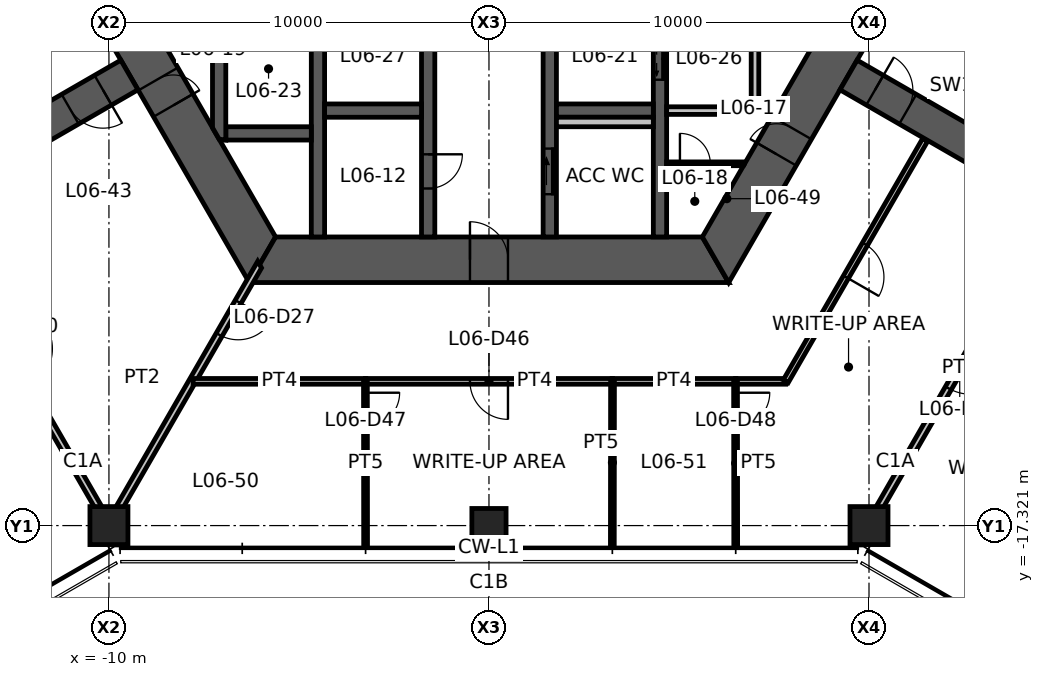
"""IFC4 building model, lengths in metres.
Left out: names, types, materials, properties, quantities, classifications, styles, units other than length and angle.
Written with IfcOpenShell. Run it as: python <this file> out.ifc"""

import sys

from ifc_helpers import new_model, si_unit, direction, frame, frame_2d, origin, origin_2d, place, context, subcontext, project, spatial, polyline, rectangle, hollow_rectangle, outline, extrude, element, fill, save


model = new_model("IFC4")
c1 = context("Model", 3, precision=1e-05, world=origin(), true_north=direction((0.0, 1.0)))
c2 = subcontext(c1, "Body", "Model", "MODEL_VIEW")
j1 = project(units=[si_unit("LENGTHUNIT", "METRE"), si_unit("PLANEANGLEUNIT", "RADIAN")], contexts=[c1])
p1 = place(None, origin())
s1 = spatial("IfcSite", under=j1, at=p1, CompositionType="ELEMENT")
p2 = place(p1, origin())
s2 = spatial("IfcBuilding", under=s1, at=p2, CompositionType="ELEMENT")
p3 = place(p2, frame((0.0, 0.0, 22.6)))
s3 = spatial("IfcBuildingStorey", under=s2, at=p3, CompositionType="ELEMENT", Elevation=22.6)
for number, where, z_axis, x_axis in (
    (1, (-10.0, -17.321, 0.0), (0.0, 0.0, 1.0), (1.0, 0.0, 0.0)),
    (2, (10.0, -17.321, 0.0), (0.0, 0.0, 1.0), (1.0, 0.0, 0.0)),
):
    element("IfcColumn", number, at=place(p3, frame(where, z_axis=z_axis, x_axis=x_axis)), inside=s3, PredefinedType="COLUMN", context=c2, shape_type="SweptSolid", body=[
        extrude(hollow_rectangle(XDim=1.0, YDim=1.0, WallThickness=0.06, at=origin_2d()), origin(), (0.0, 0.0, 1.0), 4.2),
    ])
p4 = place(p3, frame((0.0, -17.321, 0.0), z_axis=(0.0, 0.0, 1.0), x_axis=(1.0, 0.0, 0.0)))
e3 = element("IfcColumn", 3, at=p4, inside=s3, PredefinedType="COLUMN", context=c2, shape_type="SweptSolid", body=[
    extrude(hollow_rectangle(XDim=0.9, YDim=0.9, WallThickness=0.05, at=origin_2d()), origin(), (0.0, 0.0, 1.0), 4.2),
])
p5 = place(p3, frame((-11.922, 0.0, 0.0), z_axis=(0.0, 0.0, 1.0), x_axis=(0.500004296715, -0.866022923061, 0.0)))
e4 = element("IfcWall", 4, at=p5, inside=s3, PredefinedType="SHEAR", context=c2, shape_type="SweptSolid", body=[
    extrude(outline(polyline([(-0.346, -0.6), (6.431, -0.6), (7.231, -0.6), (12.269, -0.6), (11.576, 0.6), (7.231, 0.6), (6.431, 0.6), (0.346, 0.6), (-0.346, -0.6)])), origin(), (0.0, 0.0, 1.0), 4.2),
])
p6 = place(p5, frame((6.431, 0.0, 0.0)))
e5 = element("IfcOpeningElement", 5, at=p6, cuts=e4, PredefinedType="OPENING", context=c2, shape_type="SweptSolid", body=[
    extrude(rectangle(XDim=0.8, YDim=2.1, at=frame_2d((0.4, 1.05))), frame((0.0, 0.61, 0.0), z_axis=(0.0, -1.0, 0.0), x_axis=(1.0, 0.0, 0.0)), (0.0, 0.0, 1.0), 1.22),
])
p7 = place(p3, frame((-5.961, -10.325, 0.0), z_axis=(0.0, 0.0, 1.0), x_axis=(1.0, 0.0, 0.0)))
e6 = element("IfcWall", 6, at=p7, inside=s3, PredefinedType="SHEAR", context=c2, shape_type="SweptSolid", body=[
    extrude(outline(polyline([(-0.346, -0.6), (5.461, -0.6), (6.461, -0.6), (12.269, -0.6), (11.576, 0.6), (6.461, 0.6), (5.461, 0.6), (0.346, 0.6), (-0.346, -0.6)])), origin(), (0.0, 0.0, 1.0), 4.2),
])
p8 = place(p7, frame((5.461, 0.0, 0.0)))
e7 = element("IfcOpeningElement", 7, at=p8, cuts=e6, PredefinedType="OPENING", context=c2, shape_type="SweptSolid", body=[
    extrude(rectangle(XDim=1.0, YDim=2.1, at=frame_2d((0.5, 1.05))), frame((0.0, 0.61, 0.0), z_axis=(0.0, -1.0, 0.0), x_axis=(1.0, 0.0, 0.0)), (0.0, 0.0, 1.0), 1.22),
])
p9 = place(p3, frame((5.961, -10.325, 0.0), z_axis=(0.0, 0.0, 1.0), x_axis=(0.500004296715, 0.866022923061, 0.0)))
e8 = element("IfcWall", 8, at=p9, inside=s3, PredefinedType="SHEAR", context=c2, shape_type="SweptSolid", body=[
    extrude(outline(polyline([(-0.346, -0.6), (3.208, -0.6), (4.009, -0.6), (12.269, -0.6), (11.576, 0.6), (4.009, 0.6), (3.208, 0.6), (0.346, 0.6), (-0.346, -0.6)])), origin(), (0.0, 0.0, 1.0), 4.2),
])
p10 = place(p9, frame((3.208, 0.0, 0.0)))
e9 = element("IfcOpeningElement", 9, at=p10, cuts=e8, PredefinedType="OPENING", context=c2, shape_type="SweptSolid", body=[
    extrude(rectangle(XDim=0.8, YDim=2.1, at=frame_2d((0.4, 1.05))), frame((0.0, 0.61, 0.0), z_axis=(0.0, -1.0, 0.0), x_axis=(1.0, 0.0, 0.0)), (0.0, 0.0, 1.0), 1.22),
])
p11 = place(p3, frame((-9.461, -5.462, 0.0), z_axis=(0.0, 0.0, 1.0), x_axis=(-0.866019116917, -0.500010889016, 0.0)))
e10 = element("IfcWall", 10, at=p11, inside=s3, PredefinedType="SHEAR", context=c2, shape_type="SweptSolid", body=[
    extrude(rectangle(XDim=7.595, YDim=0.9, at=frame_2d((3.798, 0.0))), origin(), (0.0, 0.0, 1.0), 4.2),
])
p12 = place(p11, frame((0.8, 0.0, 0.0)))
e11 = element("IfcOpeningElement", 11, at=p12, cuts=e10, PredefinedType="OPENING", context=c2, shape_type="SweptSolid", body=[
    extrude(rectangle(XDim=1.0, YDim=2.1, at=frame_2d((0.5, 1.05))), frame((0.0, 0.46, 0.0), z_axis=(0.0, -1.0, 0.0), x_axis=(1.0, 0.0, 0.0)), (0.0, 0.0, 1.0), 0.92),
])
p13 = place(p3, frame((9.461, -5.462, 0.0), z_axis=(0.0, 0.0, 1.0), x_axis=(0.866019116917, -0.500010889016, 0.0)))
e12 = element("IfcWall", 12, at=p13, inside=s3, PredefinedType="SHEAR", context=c2, shape_type="SweptSolid", body=[
    extrude(rectangle(XDim=7.595, YDim=0.9, at=frame_2d((3.798, 0.0))), origin(), (0.0, 0.0, 1.0), 4.2),
])
p14 = place(p13, frame((0.8, 0.0, 0.0)))
e13 = element("IfcOpeningElement", 13, at=p14, cuts=e12, PredefinedType="OPENING", context=c2, shape_type="SweptSolid", body=[
    extrude(rectangle(XDim=1.0, YDim=2.1, at=frame_2d((0.5, 1.05))), frame((0.0, 0.46, 0.0), z_axis=(0.0, -1.0, 0.0), x_axis=(1.0, 0.0, 0.0)), (0.0, 0.0, 1.0), 0.92),
])
p15 = place(p3, frame((-1.6, -3.775, 0.0), z_axis=(0.0, 0.0, 1.0), x_axis=(0.0, -1.0, 0.0)))
e14 = element("IfcWall", 14, at=p15, inside=s3, PredefinedType="SHEAR", context=c2, shape_type="SweptSolid", body=[
    extrude(rectangle(XDim=5.95, YDim=0.35, at=frame_2d((2.975, 0.0))), origin(), (0.0, 0.0, 1.0), 4.2),
])
p16 = place(p15, frame((3.775, 0.0, 0.0)))
e15 = element("IfcOpeningElement", 15, at=p16, cuts=e14, PredefinedType="OPENING", context=c2, shape_type="SweptSolid", body=[
    extrude(rectangle(XDim=0.9, YDim=2.1, at=frame_2d((0.45, 1.05))), frame((0.0, 0.185, 0.0), z_axis=(0.0, -1.0, 0.0), x_axis=(1.0, 0.0, 0.0)), (0.0, 0.0, 1.0), 0.37),
])
p17 = place(p3, frame((1.6, -3.775, 0.0), z_axis=(0.0, 0.0, 1.0), x_axis=(0.0, -1.0, 0.0)))
e16 = element("IfcWall", 16, at=p17, inside=s3, PredefinedType="SHEAR", context=c2, shape_type="SweptSolid", body=[
    extrude(rectangle(XDim=5.95, YDim=0.35, at=frame_2d((2.975, 0.0))), origin(), (0.0, 0.0, 1.0), 4.2),
])
p18 = place(p17, frame((3.625, 0.0, 0.0)))
e17 = element("IfcOpeningElement", 17, at=p18, cuts=e16, PredefinedType="OPENING", context=c2, shape_type="SweptSolid", body=[
    extrude(rectangle(XDim=1.2, YDim=2.1, at=frame_2d((0.6, 1.05))), frame((0.0, 0.185, 0.0), z_axis=(0.0, -1.0, 0.0), x_axis=(1.0, 0.0, 0.0)), (0.0, 0.0, 1.0), 0.37),
])
p19 = place(p3, frame((-4.5, -3.775, 0.0), z_axis=(0.0, 0.0, 1.0), x_axis=(0.0, -1.0, 0.0)))
e18 = element("IfcWall", 18, at=p19, inside=s3, PredefinedType="SHEAR", context=c2, shape_type="SweptSolid", body=[
    extrude(rectangle(XDim=5.95, YDim=0.35, at=frame_2d((2.975, 0.0))), origin(), (0.0, 0.0, 1.0), 4.2),
])
p20 = place(p3, frame((4.5, -3.775, 0.0), z_axis=(0.0, 0.0, 1.0), x_axis=(0.0, -1.0, 0.0)))
e19 = element("IfcWall", 19, at=p20, inside=s3, PredefinedType="SHEAR", context=c2, shape_type="SweptSolid", body=[
    extrude(rectangle(XDim=5.95, YDim=0.35, at=frame_2d((2.975, 0.0))), origin(), (0.0, 0.0, 1.0), 4.2),
])
p21 = place(p20, frame((0.712, 0.0, 0.0)))
e20 = element("IfcOpeningElement", 20, at=p21, cuts=e19, PredefinedType="OPENING", context=c2, shape_type="SweptSolid", body=[
    extrude(rectangle(XDim=1.1, YDim=2.1, at=frame_2d((0.55, 1.05))), frame((0.0, 0.185, 0.0), z_axis=(0.0, -1.0, 0.0), x_axis=(1.0, 0.0, 0.0)), (0.0, 0.0, 1.0), 0.37),
])
for number, where, z_axis, x_axis in (
    (21, (-4.325, -6.4, 0.0), (0.0, 0.0, 1.0), (1.0, 0.0, 0.0)),
    (22, (1.775, -6.4, 0.0), (0.0, 0.0, 1.0), (1.0, 0.0, 0.0)),
):
    element("IfcWall", number, at=place(p3, frame(where, z_axis=z_axis, x_axis=x_axis)), inside=s3, PredefinedType="SHEAR", context=c2, shape_type="SweptSolid", body=[
        extrude(rectangle(XDim=2.55, YDim=0.35, at=frame_2d((1.275, 0.0))), origin(), (0.0, 0.0, 1.0), 4.2),
    ])
p22 = place(p3, frame((-6.925, -7.0, 0.0), z_axis=(0.0, 0.0, 1.0), x_axis=(1.0, 0.0, 0.0)))
e23 = element("IfcWall", 23, at=p22, inside=s3, PredefinedType="SHEAR", context=c2, shape_type="SweptSolid", body=[
    extrude(rectangle(XDim=2.25, YDim=0.35, at=frame_2d((1.125, 0.0))), origin(), (0.0, 0.0, 1.0), 4.2),
])
p23 = place(p3, frame((-7.1, -3.775, 0.0), z_axis=(0.0, 0.0, 1.0), x_axis=(0.0, -1.0, 0.0)))
e24 = element("IfcWall", 24, at=p23, inside=s3, PredefinedType="SHEAR", context=c2, shape_type="SweptSolid", body=[
    extrude(outline(polyline([(0.0, -0.175), (3.074, -0.175), (3.377, 0.0), (3.4, 0.175), (0.0, 0.175), (0.0, -0.175)])), origin(), (0.0, 0.0, 1.0), 4.2),
])
p24 = place(p3, frame((4.675, -6.4, 0.0), z_axis=(0.0, 0.0, 1.0), x_axis=(1.0, 0.0, 0.0)))
e25 = element("IfcWall", 25, at=p24, inside=s3, PredefinedType="STANDARD", context=c2, shape_type="SweptSolid", body=[
    extrude(rectangle(XDim=2.425, YDim=0.2, at=frame_2d((1.212, 0.0))), origin(), (0.0, 0.0, 1.0), 4.2),
])
p25 = place(p3, frame((7.0, -3.775, 0.0), z_axis=(0.0, 0.0, 1.0), x_axis=(0.0, -1.0, 0.0)))
e26 = element("IfcWall", 26, at=p25, inside=s3, PredefinedType="STANDARD", context=c2, shape_type="SweptSolid", body=[
    extrude(rectangle(XDim=2.525, YDim=0.2, at=frame_2d((1.263, 0.0))), origin(), (0.0, 0.0, 1.0), 4.2),
])
p26 = place(p3, frame((1.775, -6.7, 0.0), z_axis=(0.0, 0.0, 1.0), x_axis=(1.0, 0.0, 0.0)))
e27 = element("IfcWall", 27, at=p26, inside=s3, PredefinedType="PLUMBINGWALL", context=c2, shape_type="SweptSolid", body=[
    extrude(rectangle(XDim=2.55, YDim=0.25, at=frame_2d((1.275, 0.0))), origin(), (0.0, 0.0, 1.0), 4.2),
])
p27 = place(p3, frame((4.675, -7.8, 0.0), z_axis=(0.0, 0.0, 1.0), x_axis=(1.0, 0.0, 0.0)))
e28 = element("IfcWall", 28, at=p27, inside=s3, PredefinedType="PARTITIONING", context=c2, shape_type="SweptSolid", body=[
    extrude(outline(polyline([(0.0, -0.05), (0.35, -0.05), (1.15, -0.05), (2.022, -0.05), (2.051, 0.0), (2.057, 0.05), (1.15, 0.05), (0.35, 0.05), (0.0, 0.05), (0.0, -0.05)])), origin(), (0.0, 0.0, 1.0), 3.2),
])
p28 = place(p27, frame((0.35, 0.0, 0.0)))
e29 = element("IfcOpeningElement", 29, at=p28, cuts=e28, PredefinedType="OPENING", context=c2, shape_type="SweptSolid", body=[
    extrude(rectangle(XDim=0.8, YDim=2.1, at=frame_2d((0.4, 1.05))), frame((0.0, 0.06, 0.0), z_axis=(0.0, -1.0, 0.0), x_axis=(1.0, 0.0, 0.0)), (0.0, 0.0, 1.0), 0.12),
])
p29 = place(p3, frame((-6.035, -10.453, 0.0), z_axis=(0.0, 0.0, 1.0), x_axis=(-0.499993402427, -0.866029212861, 0.0)))
e30 = element("IfcWall", 30, at=p29, inside=s3, PredefinedType="PARTITIONING", context=c2, shape_type="SweptSolid", body=[
    extrude(outline(polyline([(-0.051, -0.087), (1.129, -0.087), (2.129, -0.087), (7.93, -0.087), (7.93, 0.087), (2.129, 0.087), (1.129, 0.087), (0.051, 0.087), (-0.051, -0.087)])), origin(), (0.0, 0.0, 1.0), 3.3),
])
p30 = place(p29, frame((1.129, 0.0, 0.0)))
e31 = element("IfcOpeningElement", 31, at=p30, cuts=e30, PredefinedType="OPENING", context=c2, shape_type="SweptSolid", body=[
    extrude(rectangle(XDim=1.0, YDim=2.1, at=frame_2d((0.5, 1.05))), frame((0.0, 0.098, 0.0), z_axis=(0.0, -1.0, 0.0), x_axis=(1.0, 0.0, 0.0)), (0.0, 0.0, 1.0), 0.195),
])
p31 = place(p3, frame((-14.775, -9.05, 0.0), z_axis=(0.0, 0.0, 1.0), x_axis=(0.499993908199, -0.866028920859, 0.0)))
e32 = element("IfcWall", 32, at=p31, inside=s3, PredefinedType="PARTITIONING", context=c2, shape_type="SweptSolid", body=[
    extrude(rectangle(XDim=9.55, YDim=0.175, at=frame_2d((4.775, 0.0))), origin(), (0.0, 0.0, 1.0), 3.208),
])
p32 = place(p31, frame((4.175, 0.0, 0.0)))
e33 = element("IfcOpeningElement", 33, at=p32, cuts=e32, PredefinedType="OPENING", context=c2, shape_type="SweptSolid", body=[
    extrude(rectangle(XDim=1.2, YDim=2.1, at=frame_2d((0.6, 1.05))), frame((0.0, 0.098, 0.0), z_axis=(0.0, -1.0, 0.0), x_axis=(1.0, 0.0, 0.0)), (0.0, 0.0, 1.0), 0.195),
])
p33 = place(p3, frame((14.775, -9.05, 0.0), z_axis=(0.0, 0.0, 1.0), x_axis=(-0.499993908199, -0.866028920859, 0.0)))
e34 = element("IfcWall", 34, at=p33, inside=s3, PredefinedType="PARTITIONING", context=c2, shape_type="SweptSolid", body=[
    extrude(rectangle(XDim=9.55, YDim=0.175, at=frame_2d((4.775, 0.0))), origin(), (0.0, 0.0, 1.0), 3.208),
])
p34 = place(p33, frame((4.175, 0.0, 0.0)))
e35 = element("IfcOpeningElement", 35, at=p34, cuts=e34, PredefinedType="OPENING", context=c2, shape_type="SweptSolid", body=[
    extrude(rectangle(XDim=1.2, YDim=2.1, at=frame_2d((0.6, 1.05))), frame((0.0, 0.098, 0.0), z_axis=(0.0, -1.0, 0.0), x_axis=(1.0, 0.0, 0.0)), (0.0, 0.0, 1.0), 0.195),
])
p35 = place(p3, frame((-3.241, -13.525, 0.0), z_axis=(0.0, 0.0, 1.0), x_axis=(-1.0, 0.0, 0.0)))
e36 = element("IfcWall", 36, at=p35, inside=s3, PredefinedType="PARTITIONING", context=c2, shape_type="SweptSolid", body=[
    extrude(rectangle(XDim=4.544, YDim=0.15, at=frame_2d((2.272, 0.0))), origin(), (0.0, 0.0, 1.0), 3.2),
])
p36 = place(p3, frame((6.498, -13.525, 0.0), z_axis=(0.0, 0.0, 1.0), x_axis=(-1.0, 0.0, 0.0)))
e37 = element("IfcWall", 37, at=p36, inside=s3, PredefinedType="PARTITIONING", context=c2, shape_type="SweptSolid", body=[
    extrude(rectangle(XDim=3.256, YDim=0.15, at=frame_2d((1.628, 0.0))), origin(), (0.0, 0.0, 1.0), 3.2),
])
p37 = place(p3, frame((7.809, -13.525, 0.0), z_axis=(0.0, 0.0, 1.0), x_axis=(-1.0, 0.0, 0.0)))
e38 = element("IfcWall", 38, at=p37, inside=s3, PredefinedType="PARTITIONING", context=c2, shape_type="SweptSolid", body=[
    extrude(rectangle(XDim=1.32, YDim=0.15, at=frame_2d((0.66, 0.0))), origin(), (0.0, 0.0, 1.0), 3.2),
])
p38 = place(p3, frame((11.478, -7.169, 0.0), z_axis=(0.0, 0.0, 1.0), x_axis=(-0.500010424145, -0.866019385318, 0.0)))
e39 = element("IfcWall", 39, at=p38, inside=s3, PredefinedType="PARTITIONING", context=c2, shape_type="SweptSolid", body=[
    extrude(rectangle(XDim=7.339, YDim=0.15, at=frame_2d((3.669, 0.0))), origin(), (0.0, 0.0, 1.0), 3.2),
])
p39 = place(p38, frame((3.169, 0.0, 0.0)))
e40 = element("IfcOpeningElement", 40, at=p39, cuts=e39, PredefinedType="OPENING", context=c2, shape_type="SweptSolid", body=[
    extrude(rectangle(XDim=1.0, YDim=2.1, at=frame_2d((0.5, 1.05))), frame((0.0, 0.085, 0.0), z_axis=(0.0, -1.0, 0.0), x_axis=(1.0, 0.0, 0.0)), (0.0, 0.0, 1.0), 0.17),
])
p40 = place(p3, frame((3.251, -13.525, 0.0), z_axis=(0.0, 0.0, 1.0), x_axis=(-1.0, 0.0, 0.0)))
e41 = element("IfcWall", 41, at=p40, inside=s3, PredefinedType="PARTITIONING", context=c2, shape_type="SweptSolid", body=[
    extrude(rectangle(XDim=6.502, YDim=0.15, at=frame_2d((3.251, 0.0))), origin(), (0.0, 0.0, 1.0), 3.2),
])
p41 = place(p40, frame((2.751, 0.0, 0.0)))
e42 = element("IfcOpeningElement", 42, at=p41, cuts=e41, PredefinedType="OPENING", context=c2, shape_type="SweptSolid", body=[
    extrude(rectangle(XDim=1.0, YDim=2.1, at=frame_2d((0.5, 1.05))), frame((0.0, 0.085, 0.0), z_axis=(0.0, -1.0, 0.0), x_axis=(1.0, 0.0, 0.0)), (0.0, 0.0, 1.0), 0.17),
])
p42 = place(p3, frame((-3.251, -13.525, 0.0), z_axis=(0.0, 0.0, 1.0), x_axis=(0.001076120809, -0.999999420982, 0.0)))
e43 = element("IfcWall", 43, at=p42, inside=s3, PredefinedType="PARTITIONING", context=c2, shape_type="SweptSolid", body=[
    extrude(rectangle(XDim=4.311, YDim=0.1, at=frame_2d((2.155, 0.0))), origin(), (0.0, 0.0, 1.0), 3.2),
])
p43 = place(p42, frame((0.3, 0.0, 0.0)))
e44 = element("IfcOpeningElement", 44, at=p43, cuts=e43, PredefinedType="OPENING", context=c2, shape_type="SweptSolid", body=[
    extrude(rectangle(XDim=0.9, YDim=2.1, at=frame_2d((0.45, 1.05))), frame((0.0, 0.06, 0.0), z_axis=(0.0, -1.0, 0.0), x_axis=(1.0, 0.0, 0.0)), (0.0, 0.0, 1.0), 0.12),
])
p44 = place(p3, frame((6.488, -13.525, 0.0), z_axis=(0.0, 0.0, 1.0), x_axis=(0.001076120809, -0.999999420982, 0.0)))
e45 = element("IfcWall", 45, at=p44, inside=s3, PredefinedType="PARTITIONING", context=c2, shape_type="SweptSolid", body=[
    extrude(rectangle(XDim=4.311, YDim=0.1, at=frame_2d((2.155, 0.0))), origin(), (0.0, 0.0, 1.0), 3.2),
])
p45 = place(p44, frame((0.3, 0.0, 0.0)))
e46 = element("IfcOpeningElement", 46, at=p45, cuts=e45, PredefinedType="OPENING", context=c2, shape_type="SweptSolid", body=[
    extrude(rectangle(XDim=0.9, YDim=2.1, at=frame_2d((0.45, 1.05))), frame((0.0, 0.06, 0.0), z_axis=(0.0, -1.0, 0.0), x_axis=(1.0, 0.0, 0.0)), (0.0, 0.0, 1.0), 0.12),
])
p46 = place(p3, frame((3.246, -17.801, 0.0), z_axis=(0.0, 0.0, 1.0), x_axis=(0.001084907715, 0.999999411487, 0.0)))
e47 = element("IfcWall", 47, at=p46, inside=s3, PredefinedType="PARTITIONING", context=c2, shape_type="SweptSolid", body=[
    extrude(rectangle(XDim=4.276, YDim=0.1, at=frame_2d((2.138, 0.0))), origin(), (0.0, 0.0, 1.0), 3.2),
])
p47 = place(p8, origin())
e48 = element("IfcDoor", 48, at=p47, inside=s3, OperationType="SINGLE_SWING_LEFT", PredefinedType="DOOR", context=c2, shape_type="SweptSolid", body=[
    extrude(rectangle(XDim=1.0, YDim=2.1, at=frame_2d((0.5, 1.05))), frame((0.0, 0.025, 0.0), z_axis=(0.0, -1.0, 0.0), x_axis=(1.0, 0.0, 0.0)), (0.0, 0.0, 1.0), 0.05),
])
fill(e7, e48)
p48 = place(p10, origin())
e49 = element("IfcDoor", 49, at=p48, inside=s3, OperationType="SINGLE_SWING_LEFT", PredefinedType="DOOR", context=c2, shape_type="SweptSolid", body=[
    extrude(rectangle(XDim=0.8, YDim=2.1, at=frame_2d((0.4, 1.05))), frame((0.0, 0.025, 0.0), z_axis=(0.0, -1.0, 0.0), x_axis=(1.0, 0.0, 0.0)), (0.0, 0.0, 1.0), 0.05),
])
fill(e9, e49)
p49 = place(p6, origin())
e50 = element("IfcDoor", 50, at=p49, inside=s3, OperationType="SINGLE_SWING_RIGHT", PredefinedType="DOOR", context=c2, shape_type="SweptSolid", body=[
    extrude(rectangle(XDim=0.8, YDim=2.1, at=frame_2d((0.4, 1.05))), frame((0.0, 0.025, 0.0), z_axis=(0.0, -1.0, 0.0), x_axis=(1.0, 0.0, 0.0)), (0.0, 0.0, 1.0), 0.05),
])
fill(e5, e50)
p50 = place(p18, origin())
e51 = element("IfcDoor", 51, at=p50, inside=s3, OperationType="SLIDING_TO_LEFT", PredefinedType="DOOR", context=c2, shape_type="SweptSolid", body=[
    extrude(rectangle(XDim=1.2, YDim=2.1, at=frame_2d((0.6, 1.05))), frame((0.0, 0.025, 0.0), z_axis=(0.0, -1.0, 0.0), x_axis=(1.0, 0.0, 0.0)), (0.0, 0.0, 1.0), 0.05),
])
fill(e17, e51)
p51 = place(p16, origin())
e52 = element("IfcDoor", 52, at=p51, inside=s3, OperationType="SINGLE_SWING_LEFT", PredefinedType="DOOR", context=c2, shape_type="SweptSolid", body=[
    extrude(rectangle(XDim=0.9, YDim=2.1, at=frame_2d((0.45, 1.05))), frame((0.0, 0.025, 0.0), z_axis=(0.0, -1.0, 0.0), x_axis=(1.0, 0.0, 0.0)), (0.0, 0.0, 1.0), 0.05),
])
fill(e15, e52)
p52 = place(p12, origin())
e53 = element("IfcDoor", 53, at=p52, inside=s3, OperationType="SINGLE_SWING_LEFT", PredefinedType="DOOR", context=c2, shape_type="SweptSolid", body=[
    extrude(rectangle(XDim=1.0, YDim=2.1, at=frame_2d((0.5, 1.05))), frame((0.0, 0.025, 0.0), z_axis=(0.0, -1.0, 0.0), x_axis=(1.0, 0.0, 0.0)), (0.0, 0.0, 1.0), 0.05),
])
fill(e11, e53)
p53 = place(p14, origin())
e54 = element("IfcDoor", 54, at=p53, inside=s3, OperationType="SINGLE_SWING_LEFT", PredefinedType="DOOR", context=c2, shape_type="SweptSolid", body=[
    extrude(rectangle(XDim=1.0, YDim=2.1, at=frame_2d((0.5, 1.05))), frame((0.0, 0.025, 0.0), z_axis=(0.0, -1.0, 0.0), x_axis=(1.0, 0.0, 0.0)), (0.0, 0.0, 1.0), 0.05),
])
fill(e13, e54)
p54 = place(p28, origin())
e55 = element("IfcDoor", 55, at=p54, inside=s3, OperationType="SINGLE_SWING_LEFT", PredefinedType="DOOR", context=c2, shape_type="SweptSolid", body=[
    extrude(rectangle(XDim=0.8, YDim=2.1, at=frame_2d((0.4, 1.05))), frame((0.0, 0.025, 0.0), z_axis=(0.0, -1.0, 0.0), x_axis=(1.0, 0.0, 0.0)), (0.0, 0.0, 1.0), 0.05),
])
fill(e29, e55)
p55 = place(p30, origin())
e56 = element("IfcDoor", 56, at=p55, inside=s3, OperationType="SINGLE_SWING_LEFT", PredefinedType="DOOR", context=c2, shape_type="SweptSolid", body=[
    extrude(rectangle(XDim=1.0, YDim=2.1, at=frame_2d((0.5, 1.05))), frame((0.0, 0.025, 0.0), z_axis=(0.0, -1.0, 0.0), x_axis=(1.0, 0.0, 0.0)), (0.0, 0.0, 1.0), 0.05),
])
fill(e31, e56)
p56 = place(p34, origin())
e57 = element("IfcDoor", 57, at=p56, inside=s3, OperationType="DOUBLE_DOOR_SINGLE_SWING", PredefinedType="DOOR", context=c2, shape_type="SweptSolid", body=[
    extrude(rectangle(XDim=1.2, YDim=2.1, at=frame_2d((0.6, 1.05))), frame((0.0, 0.025, 0.0), z_axis=(0.0, -1.0, 0.0), x_axis=(1.0, 0.0, 0.0)), (0.0, 0.0, 1.0), 0.05),
])
fill(e35, e57)
p57 = place(p39, origin())
e58 = element("IfcDoor", 58, at=p57, inside=s3, OperationType="SINGLE_SWING_RIGHT", PredefinedType="DOOR", context=c2, shape_type="SweptSolid", body=[
    extrude(rectangle(XDim=1.0, YDim=2.1, at=frame_2d((0.5, 1.05))), frame((0.0, 0.025, 0.0), z_axis=(0.0, -1.0, 0.0), x_axis=(1.0, 0.0, 0.0)), (0.0, 0.0, 1.0), 0.05),
])
fill(e40, e58)
p58 = place(p41, origin())
e59 = element("IfcDoor", 59, at=p58, inside=s3, OperationType="SINGLE_SWING_LEFT", PredefinedType="DOOR", context=c2, shape_type="SweptSolid", body=[
    extrude(rectangle(XDim=1.0, YDim=2.1, at=frame_2d((0.5, 1.05))), frame((0.0, 0.025, 0.0), z_axis=(0.0, -1.0, 0.0), x_axis=(1.0, 0.0, 0.0)), (0.0, 0.0, 1.0), 0.05),
])
fill(e42, e59)
p59 = place(p43, origin())
e60 = element("IfcDoor", 60, at=p59, inside=s3, OperationType="SINGLE_SWING_LEFT", PredefinedType="DOOR", context=c2, shape_type="SweptSolid", body=[
    extrude(rectangle(XDim=0.9, YDim=2.1, at=frame_2d((0.45, 1.05))), frame((0.0, 0.025, 0.0), z_axis=(0.0, -1.0, 0.0), x_axis=(1.0, 0.0, 0.0)), (0.0, 0.0, 1.0), 0.05),
])
fill(e44, e60)
p60 = place(p45, origin())
e61 = element("IfcDoor", 61, at=p60, inside=s3, OperationType="SINGLE_SWING_LEFT", PredefinedType="DOOR", context=c2, shape_type="SweptSolid", body=[
    extrude(rectangle(XDim=0.9, YDim=2.1, at=frame_2d((0.45, 1.05))), frame((0.0, 0.025, 0.0), z_axis=(0.0, -1.0, 0.0), x_axis=(1.0, 0.0, 0.0)), (0.0, 0.0, 1.0), 0.05),
])
fill(e46, e61)
p61 = place(p21, origin())
e62 = element("IfcDoor", 62, at=p61, inside=s3, OperationType="DOUBLE_DOOR_SLIDING", PredefinedType="DOOR", context=c2, shape_type="SweptSolid", body=[
    extrude(rectangle(XDim=1.1, YDim=2.1, at=frame_2d((0.55, 1.05))), frame((0.0, 0.025, 0.0), z_axis=(0.0, -1.0, 0.0), x_axis=(1.0, 0.0, 0.0)), (0.0, 0.0, 1.0), 0.05),
])
fill(e20, e62)
save(model, sys.argv[1])
